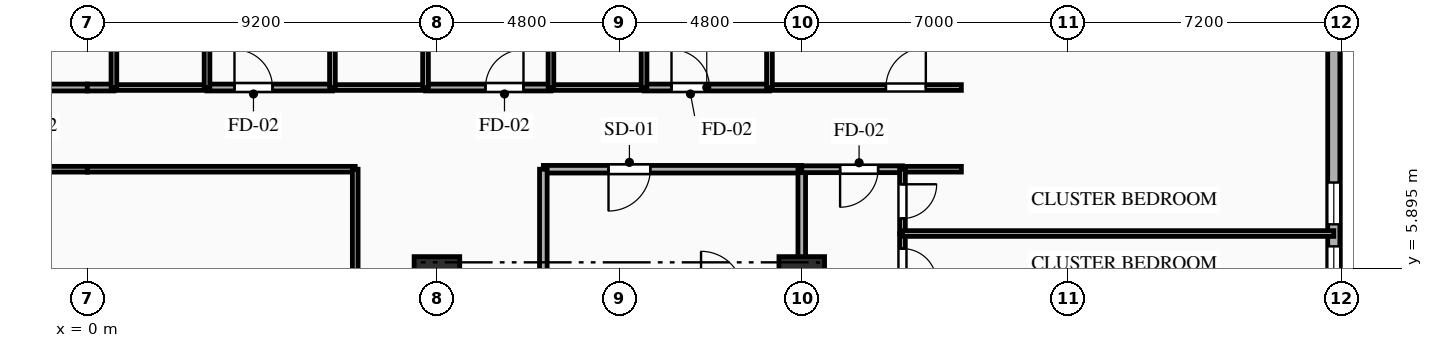
"""IFC4 building model, lengths in metres.
Left out: names, types, materials, properties, quantities, classifications, styles, units other than length and angle.
Written with IfcOpenShell. Run it as: python <this file> out.ifc"""

import sys

from ifc_helpers import new_model, si_unit, direction, frame, frame_2d, origin, origin_2d, place, context, subcontext, project, spatial, rectangle, extrude, element, fill, save


model = new_model("IFC4")
c1 = context("Model", 3, precision=1e-05, world=origin(), true_north=direction((0.0, 1.0)))
c2 = subcontext(c1, "Body", "Model", "MODEL_VIEW")
j1 = project(units=[si_unit("LENGTHUNIT", "METRE"), si_unit("PLANEANGLEUNIT", "RADIAN")], contexts=[c1])
p1 = place(None, origin())
s1 = spatial("IfcSite", under=j1, at=p1, CompositionType="ELEMENT")
p2 = place(p1, origin())
s2 = spatial("IfcBuilding", under=s1, at=p2, CompositionType="ELEMENT")
p3 = place(p2, frame((0.0, 0.0, 60.5)))
s3 = spatial("IfcBuildingStorey", under=s2, at=p3, CompositionType="ELEMENT", Elevation=60.5)
for number, where, z_axis, x_axis in (
    (1, (9.2, 5.6, 0.0), (0.0, 0.0, 1.0), (1.0, 0.0, 0.0)),
    (2, (18.8, 5.6, 0.0), (0.0, 0.0, 1.0), (1.0, 0.0, 0.0)),
):
    element("IfcColumn", number, at=place(p3, frame(where, z_axis=z_axis, x_axis=x_axis)), inside=s3, PredefinedType="COLUMN", context=c2, shape_type="SweptSolid", body=[
        extrude(rectangle(XDim=1.2, YDim=1.2, at=origin_2d()), origin(), (0.0, 0.0, 1.0), 3.35),
    ])
p4 = place(p3, frame((32.8, 15.8, 0.0), z_axis=(0.0, 0.0, 1.0), x_axis=(0.0, -1.0, 0.0)))
e3 = element("IfcWall", 3, at=p4, inside=s3, PredefinedType="SOLIDWALL", context=c2, shape_type="SweptSolid", body=[
    extrude(rectangle(XDim=31.6, YDim=0.32, at=frame_2d((15.8, 0.0))), origin(), (0.0, 0.0, 1.0), 3.035),
])
p5 = place(p4, frame((7.65, 0.0, 0.85)))
e4 = element("IfcOpeningElement", 4, at=p5, cuts=e3, PredefinedType="OPENING", context=c2, shape_type="SweptSolid", body=[
    extrude(rectangle(XDim=1.1, YDim=1.85, at=frame_2d((0.55, 0.925))), frame((0.0, 0.17, 0.0), z_axis=(0.0, -1.0, 0.0), x_axis=(1.0, 0.0, 0.0)), (0.0, 0.0, 1.0), 0.34),
])
p6 = place(p4, frame((9.33, 0.0, 0.85)))
e5 = element("IfcOpeningElement", 5, at=p6, cuts=e3, PredefinedType="OPENING", context=c2, shape_type="SweptSolid", body=[
    extrude(rectangle(XDim=1.1, YDim=1.85, at=frame_2d((0.55, 0.925))), frame((0.0, 0.17, 0.0), z_axis=(0.0, -1.0, 0.0), x_axis=(1.0, 0.0, 0.0)), (0.0, 0.0, 1.0), 0.34),
])
p7 = place(p4, frame((11.01, 0.0, 0.85)))
e6 = element("IfcOpeningElement", 6, at=p7, cuts=e3, PredefinedType="OPENING", context=c2, shape_type="SweptSolid", body=[
    extrude(rectangle(XDim=1.1, YDim=1.85, at=frame_2d((0.55, 0.925))), frame((0.0, 0.17, 0.0), z_axis=(0.0, -1.0, 0.0), x_axis=(1.0, 0.0, 0.0)), (0.0, 0.0, 1.0), 0.34),
])
p8 = place(p4, frame((12.69, 0.0, 0.85)))
e7 = element("IfcOpeningElement", 7, at=p8, cuts=e3, PredefinedType="OPENING", context=c2, shape_type="SweptSolid", body=[
    extrude(rectangle(XDim=1.1, YDim=1.85, at=frame_2d((0.55, 0.925))), frame((0.0, 0.17, 0.0), z_axis=(0.0, -1.0, 0.0), x_axis=(1.0, 0.0, 0.0)), (0.0, 0.0, 1.0), 0.34),
])
p9 = place(p4, frame((14.41, 0.0, 0.85)))
e8 = element("IfcOpeningElement", 8, at=p9, cuts=e3, PredefinedType="OPENING", context=c2, shape_type="SweptSolid", body=[
    extrude(rectangle(XDim=1.1, YDim=1.85, at=frame_2d((0.55, 0.925))), frame((0.0, 0.17, 0.0), z_axis=(0.0, -1.0, 0.0), x_axis=(1.0, 0.0, 0.0)), (0.0, 0.0, 1.0), 0.34),
])
p10 = place(p4, frame((17.665, 0.0, 0.85)))
e9 = element("IfcOpeningElement", 9, at=p10, cuts=e3, PredefinedType="OPENING", context=c2, shape_type="SweptSolid", body=[
    extrude(rectangle(XDim=1.95, YDim=1.85, at=frame_2d((0.975, 0.925))), frame((0.0, 0.17, 0.0), z_axis=(0.0, -1.0, 0.0), x_axis=(1.0, 0.0, 0.0)), (0.0, 0.0, 1.0), 0.34),
])
p11 = place(p3, frame((18.8, 8.5, 0.0), z_axis=(0.0, 0.0, 1.0), x_axis=(-1.0, 0.0, 0.0)))
e10 = element("IfcWall", 10, at=p11, inside=s3, PredefinedType="PARTITIONING", context=c2, shape_type="SweptSolid", body=[
    extrude(rectangle(XDim=6.8, YDim=0.2, at=frame_2d((3.4, 0.0))), origin(), (0.0, 0.0, 1.0), 3.035),
])
p12 = place(p11, frame((3.985, 0.0, 0.0)))
e11 = element("IfcOpeningElement", 11, at=p12, cuts=e10, PredefinedType="OPENING", context=c2, shape_type="SweptSolid", body=[
    extrude(rectangle(XDim=1.1, YDim=2.15, at=frame_2d((0.55, 1.075))), frame((0.0, 0.11, 0.0), z_axis=(0.0, -1.0, 0.0), x_axis=(1.0, 0.0, 0.0)), (0.0, 0.0, 1.0), 0.22),
])
p13 = place(p3, frame((12.0, 8.5, 0.0), z_axis=(0.0, 0.0, 1.0), x_axis=(0.0, -1.0, 0.0)))
e12 = element("IfcWall", 12, at=p13, inside=s3, PredefinedType="PARTITIONING", context=c2, shape_type="SweptSolid", body=[
    extrude(rectangle(XDim=2.9, YDim=0.2, at=frame_2d((1.45, 0.0))), origin(), (0.0, 0.0, 1.0), 3.035),
])
p14 = place(p3, frame((18.8, 5.6, 0.0), z_axis=(0.0, 0.0, 1.0), x_axis=(0.0, 1.0, 0.0)))
e13 = element("IfcWall", 13, at=p14, inside=s3, PredefinedType="PARTITIONING", context=c2, shape_type="SweptSolid", body=[
    extrude(rectangle(XDim=2.9, YDim=0.2, at=frame_2d((1.45, 0.0))), origin(), (0.0, 0.0, 1.0), 2.52),
])
p15 = place(p3, frame((-2.6, 10.65, 0.0), z_axis=(0.0, 0.0, 1.0), x_axis=(1.0, 0.0, 0.0)))
e14 = element("IfcWall", 14, at=p15, inside=s3, PredefinedType="PARTITIONING", context=c2, shape_type="SweptSolid", body=[
    extrude(rectangle(XDim=2.6, YDim=0.18, at=frame_2d((1.3, 0.0))), origin(), (0.0, 0.0, 1.0), 3.035),
])
p16 = place(p15, frame((0.635, 0.0, 0.0)))
e15 = element("IfcOpeningElement", 15, at=p16, cuts=e14, PredefinedType="OPENING", context=c2, shape_type="SweptSolid", body=[
    extrude(rectangle(XDim=1.0, YDim=2.15, at=frame_2d((0.5, 1.075))), frame((0.0, 0.1, 0.0), z_axis=(0.0, -1.0, 0.0), x_axis=(1.0, 0.0, 0.0)), (0.0, 0.0, 1.0), 0.2),
])
p17 = place(p3, frame((0.0, 8.5, 0.0), z_axis=(0.0, 0.0, 1.0), x_axis=(-1.0, 0.0, 0.0)))
e16 = element("IfcWall", 16, at=p17, inside=s3, PredefinedType="PARTITIONING", context=c2, shape_type="SweptSolid", body=[
    extrude(rectangle(XDim=7.05, YDim=0.15, at=frame_2d((3.525, 0.0))), origin(), (0.0, 0.0, 1.0), 3.035),
])
p18 = place(p17, frame((1.185, 0.0, 0.0)))
e17 = element("IfcOpeningElement", 17, at=p18, cuts=e16, PredefinedType="OPENING", context=c2, shape_type="SweptSolid", body=[
    extrude(rectangle(XDim=1.05, YDim=2.15, at=frame_2d((0.525, 1.075))), frame((0.0, 0.085, 0.0), z_axis=(0.0, -1.0, 0.0), x_axis=(1.0, 0.0, 0.0)), (0.0, 0.0, 1.0), 0.17),
])
p19 = place(p3, frame((21.45, 8.5, 0.0), z_axis=(0.0, 0.0, 1.0), x_axis=(-1.0, 0.0, 0.0)))
e18 = element("IfcWall", 18, at=p19, inside=s3, PredefinedType="PARTITIONING", context=c2, shape_type="SweptSolid", body=[
    extrude(rectangle(XDim=2.65, YDim=0.18, at=frame_2d((1.325, 0.0))), origin(), (0.0, 0.0, 1.0), 3.035),
])
p20 = place(p19, frame((0.641, 0.0, 0.0)))
e19 = element("IfcOpeningElement", 19, at=p20, cuts=e18, PredefinedType="OPENING", context=c2, shape_type="SweptSolid", body=[
    extrude(rectangle(XDim=1.0, YDim=2.15, at=frame_2d((0.5, 1.075))), frame((0.0, 0.1, 0.0), z_axis=(0.0, -1.0, 0.0), x_axis=(1.0, 0.0, 0.0)), (0.0, 0.0, 1.0), 0.2),
])
p21 = place(p3, frame((23.0, 8.5, 0.0), z_axis=(0.0, 0.0, 1.0), x_axis=(-1.0, 0.0, 0.0)))
e20 = element("IfcWall", 20, at=p21, inside=s3, PredefinedType="PARTITIONING", context=c2, shape_type="SweptSolid", body=[
    extrude(rectangle(XDim=1.55, YDim=0.15, at=frame_2d((0.775, 0.0))), origin(), (0.0, 0.0, 1.0), 3.035),
])
p22 = place(p3, frame((0.0, 10.65, 0.0), z_axis=(0.0, 0.0, 1.0), x_axis=(1.0, 0.0, 0.0)))
e21 = element("IfcWall", 21, at=p22, inside=s3, PredefinedType="PARTITIONING", context=c2, shape_type="SweptSolid", body=[
    extrude(rectangle(XDim=0.7, YDim=0.18, at=frame_2d((0.35, 0.0))), origin(), (0.0, 0.0, 1.0), 3.035),
])
p23 = place(p3, frame((3.15, 10.65, 0.0), z_axis=(0.0, 0.0, 1.0), x_axis=(1.0, 0.0, 0.0)))
e22 = element("IfcWall", 22, at=p23, inside=s3, PredefinedType="PARTITIONING", context=c2, shape_type="SweptSolid", body=[
    extrude(rectangle(XDim=3.3, YDim=0.18, at=frame_2d((1.65, 0.0))), origin(), (0.0, 0.0, 1.0), 3.035),
])
p24 = place(p23, frame((0.722, 0.0, 0.0)))
e23 = element("IfcOpeningElement", 23, at=p24, cuts=e22, PredefinedType="OPENING", context=c2, shape_type="SweptSolid", body=[
    extrude(rectangle(XDim=1.0, YDim=2.15, at=frame_2d((0.5, 1.075))), frame((0.0, 0.1, 0.0), z_axis=(0.0, -1.0, 0.0), x_axis=(1.0, 0.0, 0.0)), (0.0, 0.0, 1.0), 0.2),
])
p25 = place(p3, frame((0.7, 10.65, 0.0), z_axis=(0.0, 0.0, 1.0), x_axis=(1.0, 0.0, 0.0)))
e24 = element("IfcWall", 24, at=p25, inside=s3, PredefinedType="PLUMBINGWALL", context=c2, shape_type="SweptSolid", body=[
    extrude(rectangle(XDim=2.45, YDim=0.15, at=frame_2d((1.225, 0.0))), origin(), (0.0, 0.0, 1.0), 3.035),
])
p26 = place(p3, frame((8.9, 10.65, 0.0), z_axis=(0.0, 0.0, 1.0), x_axis=(1.0, 0.0, 0.0)))
e25 = element("IfcWall", 25, at=p26, inside=s3, PredefinedType="PARTITIONING", context=c2, shape_type="SweptSolid", body=[
    extrude(rectangle(XDim=3.3, YDim=0.18, at=frame_2d((1.65, 0.0))), origin(), (0.0, 0.0, 1.0), 3.035),
])
p27 = place(p26, frame((1.577, 0.0, 0.0)))
e26 = element("IfcOpeningElement", 26, at=p27, cuts=e25, PredefinedType="OPENING", context=c2, shape_type="SweptSolid", body=[
    extrude(rectangle(XDim=1.0, YDim=2.15, at=frame_2d((0.5, 1.075))), frame((0.0, 0.1, 0.0), z_axis=(0.0, -1.0, 0.0), x_axis=(1.0, 0.0, 0.0)), (0.0, 0.0, 1.0), 0.2),
])
p28 = place(p3, frame((6.45, 10.65, 0.0), z_axis=(0.0, 0.0, 1.0), x_axis=(1.0, 0.0, 0.0)))
e27 = element("IfcWall", 27, at=p28, inside=s3, PredefinedType="PLUMBINGWALL", context=c2, shape_type="SweptSolid", body=[
    extrude(rectangle(XDim=2.45, YDim=0.15, at=frame_2d((1.225, 0.0))), origin(), (0.0, 0.0, 1.0), 3.035),
])
p29 = place(p3, frame((14.65, 10.65, 0.0), z_axis=(0.0, 0.0, 1.0), x_axis=(1.0, 0.0, 0.0)))
e28 = element("IfcWall", 28, at=p29, inside=s3, PredefinedType="PARTITIONING", context=c2, shape_type="SweptSolid", body=[
    extrude(rectangle(XDim=3.3, YDim=0.18, at=frame_2d((1.65, 0.0))), origin(), (0.0, 0.0, 1.0), 3.035),
])
p30 = place(p29, frame((0.722, 0.0, 0.0)))
e29 = element("IfcOpeningElement", 29, at=p30, cuts=e28, PredefinedType="OPENING", context=c2, shape_type="SweptSolid", body=[
    extrude(rectangle(XDim=1.0, YDim=2.15, at=frame_2d((0.5, 1.075))), frame((0.0, 0.1, 0.0), z_axis=(0.0, -1.0, 0.0), x_axis=(1.0, 0.0, 0.0)), (0.0, 0.0, 1.0), 0.2),
])
p31 = place(p3, frame((12.2, 10.65, 0.0), z_axis=(0.0, 0.0, 1.0), x_axis=(1.0, 0.0, 0.0)))
e30 = element("IfcWall", 30, at=p31, inside=s3, PredefinedType="PLUMBINGWALL", context=c2, shape_type="SweptSolid", body=[
    extrude(rectangle(XDim=2.45, YDim=0.15, at=frame_2d((1.225, 0.0))), origin(), (0.0, 0.0, 1.0), 3.035),
])
p32 = place(p3, frame((17.95, 10.65, 0.0), z_axis=(0.0, 0.0, 1.0), x_axis=(1.0, 0.0, 0.0)))
e31 = element("IfcWall", 31, at=p32, inside=s3, PredefinedType="PARTITIONING", context=c2, shape_type="SweptSolid", body=[
    extrude(rectangle(XDim=5.05, YDim=0.15, at=frame_2d((2.525, 0.0))), origin(), (0.0, 0.0, 1.0), 3.035),
])
p33 = place(p32, frame((3.065, 0.0, 0.0)))
e32 = element("IfcOpeningElement", 32, at=p33, cuts=e31, PredefinedType="OPENING", context=c2, shape_type="SweptSolid", body=[
    extrude(rectangle(XDim=1.05, YDim=2.15, at=frame_2d((0.525, 1.075))), frame((0.0, 0.085, 0.0), z_axis=(0.0, -1.0, 0.0), x_axis=(1.0, 0.0, 0.0)), (0.0, 0.0, 1.0), 0.17),
])
for number, where, z_axis, x_axis in (
    (33, (7.05, 8.5, 0.0), (0.0, 0.0, 1.0), (-1.0, 0.0, 0.0)),
    (34, (7.05, 1.45, 0.0), (0.0, 0.0, 1.0), (0.0, 1.0, 0.0)),
):
    element("IfcWall", number, at=place(p3, frame(where, z_axis=z_axis, x_axis=x_axis)), inside=s3, PredefinedType="PARTITIONING", context=c2, shape_type="SweptSolid", body=[
        extrude(rectangle(XDim=7.05, YDim=0.15, at=frame_2d((3.525, 0.0))), origin(), (0.0, 0.0, 1.0), 3.035),
    ])
p34 = place(p3, frame((21.45, 6.808, 0.0), z_axis=(0.0, 0.0, 1.0), x_axis=(0.0, -1.0, 0.0)))
e35 = element("IfcWall", 35, at=p34, inside=s3, PredefinedType="PARTITIONING", context=c2, shape_type="SweptSolid", body=[
    extrude(rectangle(XDim=1.692, YDim=0.15, at=frame_2d((0.846, 0.0))), origin(), (0.0, 0.0, 1.0), 3.035),
])
p35 = place(p34, frame((0.396, 0.0, 0.0)))
e36 = element("IfcOpeningElement", 36, at=p35, cuts=e35, PredefinedType="OPENING", context=c2, shape_type="SweptSolid", body=[
    extrude(rectangle(XDim=0.9, YDim=2.1, at=frame_2d((0.45, 1.05))), frame((0.0, 0.085, 0.0), z_axis=(0.0, -1.0, 0.0), x_axis=(1.0, 0.0, 0.0)), (0.0, 0.0, 1.0), 0.17),
])
p36 = place(p3, frame((21.45, 8.5, 0.0), z_axis=(0.0, 0.0, 1.0), x_axis=(0.0, -1.0, 0.0)))
e37 = element("IfcWall", 37, at=p36, inside=s3, PredefinedType="PARTITIONING", context=c2, shape_type="SweptSolid", body=[
    extrude(rectangle(XDim=1.692, YDim=0.15, at=frame_2d((0.846, 0.0))), origin(), (0.0, 0.0, 1.0), 3.035),
])
p37 = place(p36, frame((0.396, 0.0, 0.0)))
e38 = element("IfcOpeningElement", 38, at=p37, cuts=e37, PredefinedType="OPENING", context=c2, shape_type="SweptSolid", body=[
    extrude(rectangle(XDim=0.9, YDim=2.1, at=frame_2d((0.45, 1.05))), frame((0.0, 0.085, 0.0), z_axis=(0.0, -1.0, 0.0), x_axis=(1.0, 0.0, 0.0)), (0.0, 0.0, 1.0), 0.17),
])
p38 = place(p3, frame((21.45, 6.808, 0.0), z_axis=(0.0, 0.0, 1.0), x_axis=(1.0, 0.0, 0.0)))
e39 = element("IfcWall", 39, at=p38, inside=s3, PredefinedType="PARTITIONING", context=c2, shape_type="SweptSolid", body=[
    extrude(rectangle(XDim=11.35, YDim=0.15, at=frame_2d((5.675, 0.0))), origin(), (0.0, 0.0, 1.0), 3.035),
])
for number, where, z_axis, x_axis in (
    (40, (0.7, 12.8, 0.0), (0.0, 0.0, 1.0), (0.0, -1.0, 0.0)),
    (41, (3.15, 10.65, 0.0), (0.0, 0.0, 1.0), (0.0, 1.0, 0.0)),
    (42, (6.45, 12.8, 0.0), (0.0, 0.0, 1.0), (0.0, -1.0, 0.0)),
    (43, (8.9, 10.65, 0.0), (0.0, 0.0, 1.0), (0.0, 1.0, 0.0)),
    (44, (12.2, 12.8, 0.0), (0.0, 0.0, 1.0), (0.0, -1.0, 0.0)),
    (45, (14.65, 10.65, 0.0), (0.0, 0.0, 1.0), (0.0, 1.0, 0.0)),
):
    element("IfcWall", number, at=place(p3, frame(where, z_axis=z_axis, x_axis=x_axis)), inside=s3, PredefinedType="PLUMBINGWALL", context=c2, shape_type="SweptSolid", body=[
        extrude(rectangle(XDim=2.15, YDim=0.15, at=frame_2d((1.075, 0.0))), origin(), (0.0, 0.0, 1.0), 3.035),
    ])
p39 = place(p3, frame((17.95, 19.4, 0.0), z_axis=(0.0, 0.0, 1.0), x_axis=(0.0, -1.0, 0.0)))
e46 = element("IfcWall", 46, at=p39, inside=s3, PredefinedType="PARTITIONING", context=c2, shape_type="SweptSolid", body=[
    extrude(rectangle(XDim=8.75, YDim=0.15, at=frame_2d((4.375, 0.0))), origin(), (0.0, 0.0, 1.0), 3.035),
])
p40 = place(p5, origin())
e47 = element("IfcWindow", 47, at=p40, inside=s3, PartitioningType="SINGLE_PANEL", PredefinedType="WINDOW", context=c2, shape_type="SweptSolid", body=[
    extrude(rectangle(XDim=1.1, YDim=1.85, at=frame_2d((0.55, 0.925))), frame((0.0, 0.03, 0.0), z_axis=(0.0, -1.0, 0.0), x_axis=(1.0, 0.0, 0.0)), (0.0, 0.0, 1.0), 0.06),
])
fill(e4, e47)
p41 = place(p6, origin())
e48 = element("IfcWindow", 48, at=p41, inside=s3, PartitioningType="SINGLE_PANEL", PredefinedType="WINDOW", context=c2, shape_type="SweptSolid", body=[
    extrude(rectangle(XDim=1.1, YDim=1.85, at=frame_2d((0.55, 0.925))), frame((0.0, 0.03, 0.0), z_axis=(0.0, -1.0, 0.0), x_axis=(1.0, 0.0, 0.0)), (0.0, 0.0, 1.0), 0.06),
])
fill(e5, e48)
p42 = place(p12, origin())
e49 = element("IfcDoor", 49, at=p42, inside=s3, OperationType="SINGLE_SWING_RIGHT", PredefinedType="DOOR", context=c2, shape_type="SweptSolid", body=[
    extrude(rectangle(XDim=1.1, YDim=2.15, at=frame_2d((0.55, 1.075))), frame((0.0, 0.025, 0.0), z_axis=(0.0, -1.0, 0.0), x_axis=(1.0, 0.0, 0.0)), (0.0, 0.0, 1.0), 0.05),
])
fill(e11, e49)
p43 = place(p20, origin())
e50 = element("IfcDoor", 50, at=p43, inside=s3, OperationType="SINGLE_SWING_RIGHT", PredefinedType="DOOR", context=c2, shape_type="SweptSolid", body=[
    extrude(rectangle(XDim=1.0, YDim=2.15, at=frame_2d((0.5, 1.075))), frame((0.0, 0.025, 0.0), z_axis=(0.0, -1.0, 0.0), x_axis=(1.0, 0.0, 0.0)), (0.0, 0.0, 1.0), 0.05),
])
fill(e19, e50)
p44 = place(p24, origin())
e51 = element("IfcDoor", 51, at=p44, inside=s3, OperationType="SINGLE_SWING_LEFT", PredefinedType="DOOR", context=c2, shape_type="SweptSolid", body=[
    extrude(rectangle(XDim=1.0, YDim=2.15, at=frame_2d((0.5, 1.075))), frame((0.0, 0.025, 0.0), z_axis=(0.0, -1.0, 0.0), x_axis=(1.0, 0.0, 0.0)), (0.0, 0.0, 1.0), 0.05),
])
fill(e23, e51)
p45 = place(p27, origin())
e52 = element("IfcDoor", 52, at=p45, inside=s3, OperationType="SINGLE_SWING_RIGHT", PredefinedType="DOOR", context=c2, shape_type="SweptSolid", body=[
    extrude(rectangle(XDim=1.0, YDim=2.15, at=frame_2d((0.5, 1.075))), frame((0.0, 0.025, 0.0), z_axis=(0.0, -1.0, 0.0), x_axis=(1.0, 0.0, 0.0)), (0.0, 0.0, 1.0), 0.05),
])
fill(e26, e52)
p46 = place(p30, origin())
e53 = element("IfcDoor", 53, at=p46, inside=s3, OperationType="SINGLE_SWING_LEFT", PredefinedType="DOOR", context=c2, shape_type="SweptSolid", body=[
    extrude(rectangle(XDim=1.0, YDim=2.15, at=frame_2d((0.5, 1.075))), frame((0.0, 0.025, 0.0), z_axis=(0.0, -1.0, 0.0), x_axis=(1.0, 0.0, 0.0)), (0.0, 0.0, 1.0), 0.05),
])
fill(e29, e53)
p47 = place(p33, origin())
e54 = element("IfcDoor", 54, at=p47, inside=s3, OperationType="SINGLE_SWING_RIGHT", PredefinedType="DOOR", context=c2, shape_type="SweptSolid", body=[
    extrude(rectangle(XDim=1.05, YDim=2.15, at=frame_2d((0.525, 1.075))), frame((0.0, 0.025, 0.0), z_axis=(0.0, -1.0, 0.0), x_axis=(1.0, 0.0, 0.0)), (0.0, 0.0, 1.0), 0.05),
])
fill(e32, e54)
p48 = place(p35, origin())
e55 = element("IfcDoor", 55, at=p48, inside=s3, OperationType="SINGLE_SWING_RIGHT", PredefinedType="DOOR", context=c2, shape_type="SweptSolid", body=[
    extrude(rectangle(XDim=0.9, YDim=2.1, at=frame_2d((0.45, 1.05))), frame((0.0, 0.025, 0.0), z_axis=(0.0, -1.0, 0.0), x_axis=(1.0, 0.0, 0.0)), (0.0, 0.0, 1.0), 0.05),
])
fill(e36, e55)
p49 = place(p37, origin())
e56 = element("IfcDoor", 56, at=p49, inside=s3, OperationType="SINGLE_SWING_LEFT", PredefinedType="DOOR", context=c2, shape_type="SweptSolid", body=[
    extrude(rectangle(XDim=0.9, YDim=2.1, at=frame_2d((0.45, 1.05))), frame((0.0, 0.025, 0.0), z_axis=(0.0, -1.0, 0.0), x_axis=(1.0, 0.0, 0.0)), (0.0, 0.0, 1.0), 0.05),
])
fill(e38, e56)
save(model, sys.argv[1])
